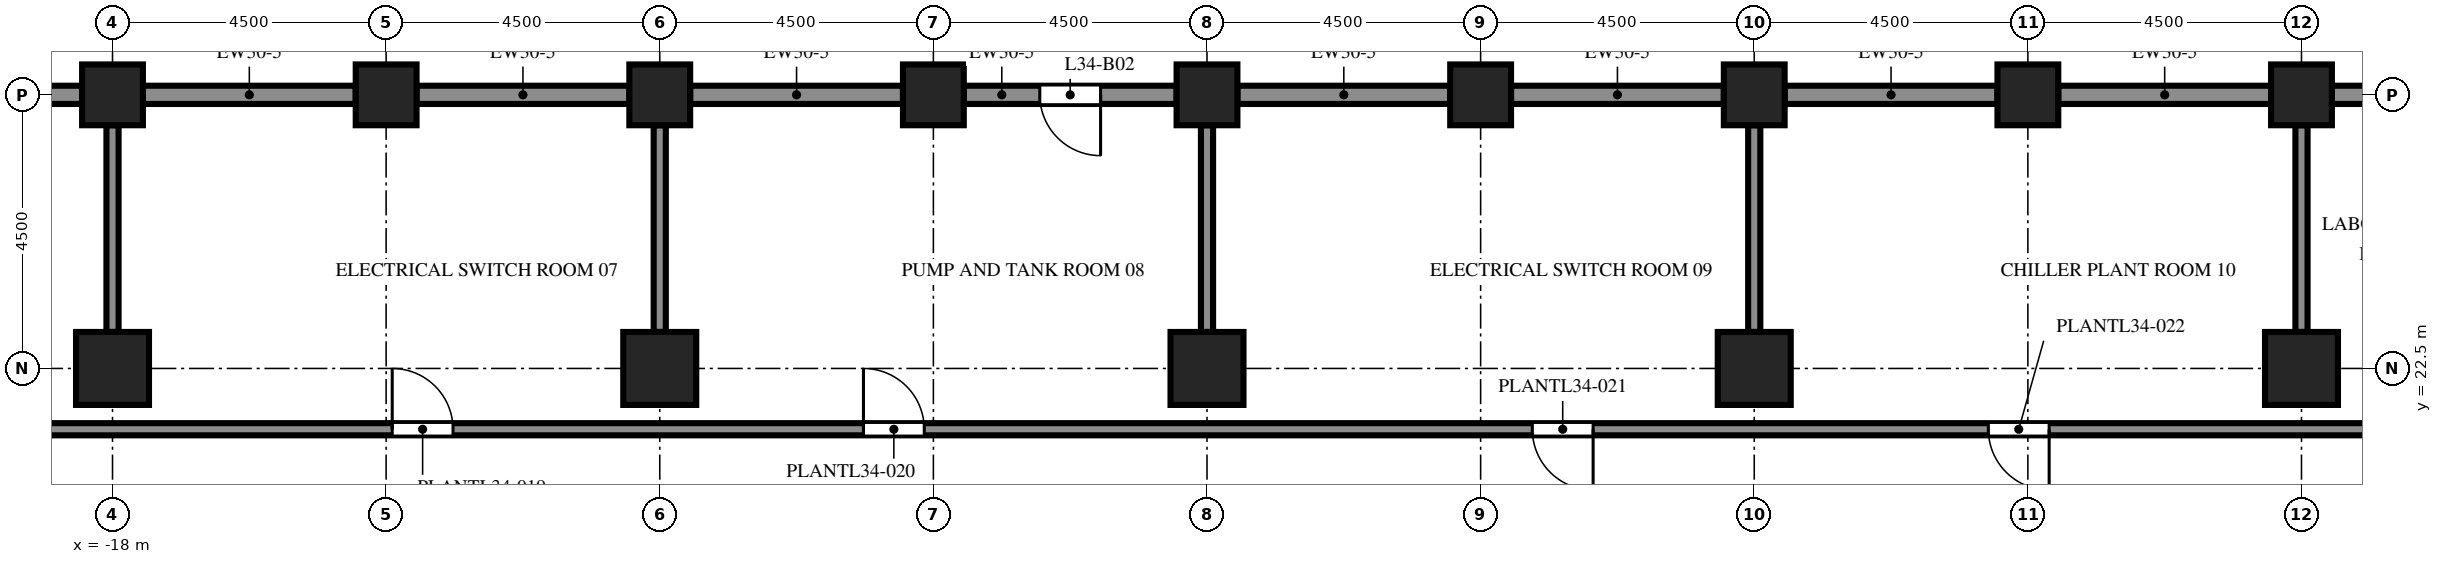
"""IFC4 building model, lengths in metres.
Left out: names, types, materials, properties, quantities, classifications, styles, units other than length and angle.
Written with IfcOpenShell. Run it as: python <this file> out.ifc"""

import sys

from ifc_helpers import new_model, si_unit, direction, frame, frame_2d, origin, origin_2d, place, context, subcontext, project, spatial, rectangle, extrude, element, fill, save


model = new_model("IFC4")
c1 = context("Model", 3, precision=1e-05, world=origin(), true_north=direction((0.0, 1.0)))
c2 = subcontext(c1, "Body", "Model", "MODEL_VIEW")
j1 = project(units=[si_unit("LENGTHUNIT", "METRE"), si_unit("PLANEANGLEUNIT", "RADIAN")], contexts=[c1])
p1 = place(None, origin())
s1 = spatial("IfcSite", under=j1, at=p1, CompositionType="ELEMENT")
p2 = place(p1, origin())
s2 = spatial("IfcBuilding", under=s1, at=p2, CompositionType="ELEMENT")
p3 = place(p2, frame((0.0, 0.0, 151.4)))
s3 = spatial("IfcBuildingStorey", under=s2, at=p3, CompositionType="ELEMENT", Elevation=151.4)
for number, where, z_axis, x_axis in (
    (1, (-18.0, 27.0, -0.6), (0.0, 0.0, 1.0), (1.0, 0.0, 0.0)),
    (2, (-13.5, 27.0, -0.6), (0.0, 0.0, 1.0), (1.0, 0.0, 0.0)),
    (3, (-9.0, 27.0, -0.6), (0.0, 0.0, 1.0), (1.0, 0.0, 0.0)),
    (4, (-4.5, 27.0, -0.6), (0.0, 0.0, 1.0), (1.0, 0.0, 0.0)),
    (5, (0.0, 27.0, -0.6), (0.0, 0.0, 1.0), (1.0, 0.0, 0.0)),
    (6, (4.5, 27.0, -0.6), (0.0, 0.0, 1.0), (1.0, 0.0, 0.0)),
    (7, (9.0, 27.0, -0.6), (0.0, 0.0, 1.0), (1.0, 0.0, 0.0)),
    (8, (13.5, 27.0, -0.6), (0.0, 0.0, 1.0), (1.0, 0.0, 0.0)),
    (9, (18.0, 27.0, -0.6), (0.0, 0.0, 1.0), (1.0, 0.0, 0.0)),
):
    element("IfcColumn", number, at=place(p3, frame(where, z_axis=z_axis, x_axis=x_axis)), inside=s3, PredefinedType="COLUMN", context=c2, shape_type="SweptSolid", body=[
        extrude(rectangle(XDim=1.0, YDim=1.0, at=origin_2d()), origin(), (0.0, 0.0, 1.0), 6.0),
    ])
for number, where, z_axis, x_axis in (
    (10, (-18.0, 22.5, 0.0), (0.0, 0.0, 1.0), (1.0, 0.0, 0.0)),
    (11, (-9.0, 22.5, 0.0), (0.0, 0.0, 1.0), (1.0, 0.0, 0.0)),
    (12, (0.0, 22.5, 0.0), (0.0, 0.0, 1.0), (1.0, 0.0, 0.0)),
    (13, (9.0, 22.5, 0.0), (0.0, 0.0, 1.0), (1.0, 0.0, 0.0)),
    (14, (18.0, 22.5, 0.0), (0.0, 0.0, 1.0), (1.0, 0.0, 0.0)),
):
    element("IfcColumn", number, at=place(p3, frame(where, z_axis=z_axis, x_axis=x_axis)), inside=s3, PredefinedType="COLUMN", context=c2, shape_type="SweptSolid", body=[
        extrude(rectangle(XDim=1.2, YDim=1.2, at=origin_2d()), origin(), (0.0, 0.0, 1.0), 5.4),
    ])
for number, where, z_axis, x_axis in (
    (15, (18.5, 27.0, 0.0), (0.0, 0.0, 1.0), (1.0, 0.0, 0.0)),
    (16, (14.0, 27.0, 0.0), (0.0, 0.0, 1.0), (1.0, 0.0, 0.0)),
    (17, (9.5, 27.0, 0.0), (0.0, 0.0, 1.0), (1.0, 0.0, 0.0)),
    (18, (5.0, 27.0, 0.0), (0.0, 0.0, 1.0), (1.0, 0.0, 0.0)),
    (19, (0.5, 27.0, 0.0), (0.0, 0.0, 1.0), (1.0, 0.0, 0.0)),
):
    element("IfcWall", number, at=place(p3, frame(where, z_axis=z_axis, x_axis=x_axis)), inside=s3, PredefinedType="SOLIDWALL", context=c2, shape_type="SweptSolid", body=[
        extrude(rectangle(XDim=3.5, YDim=0.3, at=frame_2d((1.75, 0.0))), origin(), (0.0, 0.0, 1.0), 3.75),
    ])
p4 = place(p3, frame((-4.0, 27.0, 0.0), z_axis=(0.0, 0.0, 1.0), x_axis=(1.0, 0.0, 0.0)))
e20 = element("IfcWall", 20, at=p4, inside=s3, PredefinedType="SOLIDWALL", context=c2, shape_type="SweptSolid", body=[
    extrude(rectangle(XDim=3.5, YDim=0.3, at=frame_2d((1.75, 0.0))), origin(), (0.0, 0.0, 1.0), 3.75),
])
p5 = place(p4, frame((1.25, 0.0, 0.0)))
e21 = element("IfcOpeningElement", 21, at=p5, cuts=e20, PredefinedType="OPENING", context=c2, shape_type="SweptSolid", body=[
    extrude(rectangle(XDim=1.0, YDim=2.2, at=frame_2d((0.5, 1.1))), frame((0.0, 0.16, 0.0), z_axis=(0.0, -1.0, 0.0), x_axis=(1.0, 0.0, 0.0)), (0.0, 0.0, 1.0), 0.32),
])
for number, where, z_axis, x_axis in (
    (22, (-8.5, 27.0, 0.0), (0.0, 0.0, 1.0), (1.0, 0.0, 0.0)),
    (23, (-13.0, 27.0, 0.0), (0.0, 0.0, 1.0), (1.0, 0.0, 0.0)),
    (24, (-17.5, 27.0, 0.0), (0.0, 0.0, 1.0), (1.0, 0.0, 0.0)),
    (25, (-22.0, 27.0, 0.0), (0.0, 0.0, 1.0), (1.0, 0.0, 0.0)),
):
    element("IfcWall", number, at=place(p3, frame(where, z_axis=z_axis, x_axis=x_axis)), inside=s3, PredefinedType="SOLIDWALL", context=c2, shape_type="SweptSolid", body=[
        extrude(rectangle(XDim=3.5, YDim=0.3, at=frame_2d((1.75, 0.0))), origin(), (0.0, 0.0, 1.0), 3.75),
    ])
for number, where, z_axis, x_axis in (
    (26, (-18.0, 23.1, 0.0), (0.0, 0.0, 1.0), (0.0, 1.0, 0.0)),
    (27, (-9.0, 23.1, 0.0), (0.0, 0.0, 1.0), (0.0, 1.0, 0.0)),
    (28, (0.0, 23.1, 0.0), (0.0, 0.0, 1.0), (0.0, 1.0, 0.0)),
    (29, (9.0, 23.1, 0.0), (0.0, 0.0, 1.0), (0.0, 1.0, 0.0)),
    (30, (18.0, 23.1, 0.0), (0.0, 0.0, 1.0), (0.0, 1.0, 0.0)),
):
    element("IfcWall", number, at=place(p3, frame(where, z_axis=z_axis, x_axis=x_axis)), inside=s3, PredefinedType="PARTITIONING", context=c2, shape_type="SweptSolid", body=[
        extrude(rectangle(XDim=3.4, YDim=0.2, at=frame_2d((1.7, 0.0))), origin(), (0.0, 0.0, 1.0), 4.95),
    ])
p6 = place(p3, frame((-26.85, 21.5, 0.0), z_axis=(0.0, 0.0, 1.0), x_axis=(1.0, 0.0, 0.0)))
e31 = element("IfcWall", 31, at=p6, inside=s3, PredefinedType="PARTITIONING", context=c2, shape_type="SweptSolid", body=[
    extrude(rectangle(XDim=53.7, YDim=0.2, at=frame_2d((26.85, 0.0))), origin(), (0.0, 0.0, 1.0), 4.95),
])
p7 = place(p6, frame((3.45, 0.0, 0.0)))
e32 = element("IfcOpeningElement", 32, at=p7, cuts=e31, PredefinedType="OPENING", context=c2, shape_type="SweptSolid", body=[
    extrude(rectangle(XDim=1.0, YDim=2.1, at=frame_2d((0.5, 1.05))), frame((0.0, 0.11, 0.0), z_axis=(0.0, -1.0, 0.0), x_axis=(1.0, 0.0, 0.0)), (0.0, 0.0, 1.0), 0.22),
])
p8 = place(p6, frame((13.45, 0.0, 0.0)))
e33 = element("IfcOpeningElement", 33, at=p8, cuts=e31, PredefinedType="OPENING", context=c2, shape_type="SweptSolid", body=[
    extrude(rectangle(XDim=1.0, YDim=2.1, at=frame_2d((0.5, 1.05))), frame((0.0, 0.11, 0.0), z_axis=(0.0, -1.0, 0.0), x_axis=(1.0, 0.0, 0.0)), (0.0, 0.0, 1.0), 0.22),
])
p9 = place(p6, frame((21.2, 0.0, 0.0)))
e34 = element("IfcOpeningElement", 34, at=p9, cuts=e31, PredefinedType="OPENING", context=c2, shape_type="SweptSolid", body=[
    extrude(rectangle(XDim=1.0, YDim=2.1, at=frame_2d((0.5, 1.05))), frame((0.0, 0.11, 0.0), z_axis=(0.0, -1.0, 0.0), x_axis=(1.0, 0.0, 0.0)), (0.0, 0.0, 1.0), 0.22),
])
p10 = place(p6, frame((32.2, 0.0, 0.0)))
e35 = element("IfcOpeningElement", 35, at=p10, cuts=e31, PredefinedType="OPENING", context=c2, shape_type="SweptSolid", body=[
    extrude(rectangle(XDim=1.0, YDim=2.1, at=frame_2d((0.5, 1.05))), frame((0.0, 0.11, 0.0), z_axis=(0.0, -1.0, 0.0), x_axis=(1.0, 0.0, 0.0)), (0.0, 0.0, 1.0), 0.22),
])
p11 = place(p6, frame((39.7, 0.0, 0.0)))
e36 = element("IfcOpeningElement", 36, at=p11, cuts=e31, PredefinedType="OPENING", context=c2, shape_type="SweptSolid", body=[
    extrude(rectangle(XDim=1.0, YDim=2.1, at=frame_2d((0.5, 1.05))), frame((0.0, 0.11, 0.0), z_axis=(0.0, -1.0, 0.0), x_axis=(1.0, 0.0, 0.0)), (0.0, 0.0, 1.0), 0.22),
])
p12 = place(p6, frame((50.2, 0.0, 0.0)))
e37 = element("IfcOpeningElement", 37, at=p12, cuts=e31, PredefinedType="OPENING", context=c2, shape_type="SweptSolid", body=[
    extrude(rectangle(XDim=1.0, YDim=2.1, at=frame_2d((0.5, 1.05))), frame((0.0, 0.11, 0.0), z_axis=(0.0, -1.0, 0.0), x_axis=(1.0, 0.0, 0.0)), (0.0, 0.0, 1.0), 0.22),
])
p13 = place(p5, origin())
e38 = element("IfcDoor", 38, at=p13, inside=s3, OperationType="SINGLE_SWING_RIGHT", PredefinedType="DOOR", context=c2, shape_type="SweptSolid", body=[
    extrude(rectangle(XDim=1.0, YDim=2.2, at=frame_2d((0.5, 1.1))), frame((0.0, 0.025, 0.0), z_axis=(0.0, -1.0, 0.0), x_axis=(1.0, 0.0, 0.0)), (0.0, 0.0, 1.0), 0.05),
])
fill(e21, e38)
p14 = place(p8, origin())
e39 = element("IfcDoor", 39, at=p14, inside=s3, OperationType="SINGLE_SWING_LEFT", PredefinedType="DOOR", context=c2, shape_type="SweptSolid", body=[
    extrude(rectangle(XDim=1.0, YDim=2.1, at=frame_2d((0.5, 1.05))), frame((0.0, 0.025, 0.0), z_axis=(0.0, -1.0, 0.0), x_axis=(1.0, 0.0, 0.0)), (0.0, 0.0, 1.0), 0.05),
])
fill(e33, e39)
p15 = place(p9, origin())
e40 = element("IfcDoor", 40, at=p15, inside=s3, OperationType="SINGLE_SWING_LEFT", PredefinedType="DOOR", context=c2, shape_type="SweptSolid", body=[
    extrude(rectangle(XDim=1.0, YDim=2.1, at=frame_2d((0.5, 1.05))), frame((0.0, 0.025, 0.0), z_axis=(0.0, -1.0, 0.0), x_axis=(1.0, 0.0, 0.0)), (0.0, 0.0, 1.0), 0.05),
])
fill(e34, e40)
p16 = place(p10, origin())
e41 = element("IfcDoor", 41, at=p16, inside=s3, OperationType="SINGLE_SWING_RIGHT", PredefinedType="DOOR", context=c2, shape_type="SweptSolid", body=[
    extrude(rectangle(XDim=1.0, YDim=2.1, at=frame_2d((0.5, 1.05))), frame((0.0, 0.025, 0.0), z_axis=(0.0, -1.0, 0.0), x_axis=(1.0, 0.0, 0.0)), (0.0, 0.0, 1.0), 0.05),
])
fill(e35, e41)
p17 = place(p11, origin())
e42 = element("IfcDoor", 42, at=p17, inside=s3, OperationType="SINGLE_SWING_RIGHT", PredefinedType="DOOR", context=c2, shape_type="SweptSolid", body=[
    extrude(rectangle(XDim=1.0, YDim=2.1, at=frame_2d((0.5, 1.05))), frame((0.0, 0.025, 0.0), z_axis=(0.0, -1.0, 0.0), x_axis=(1.0, 0.0, 0.0)), (0.0, 0.0, 1.0), 0.05),
])
fill(e36, e42)
save(model, sys.argv[1])
